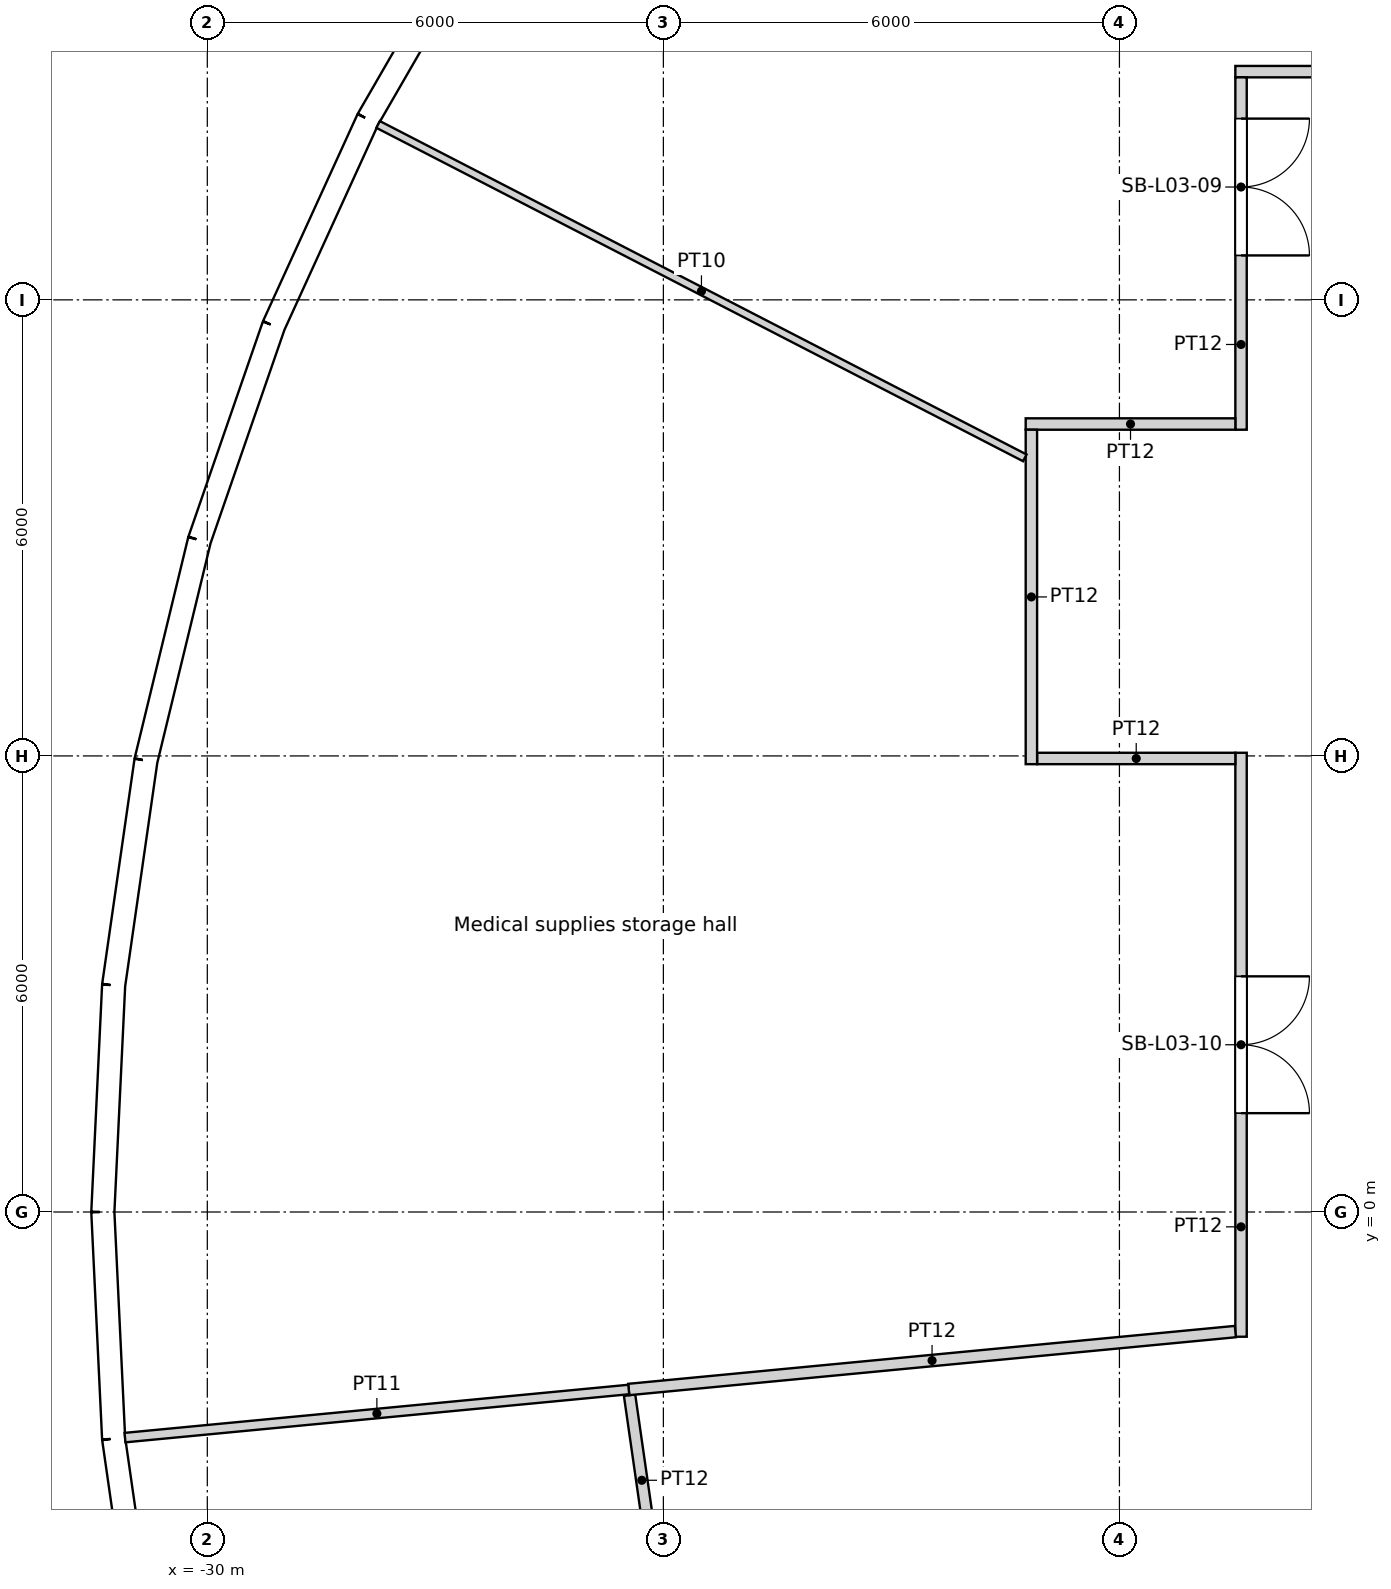
"""IFC4 building model, lengths in metres.
Left out: names, types, materials, properties, quantities, classifications, styles, units other than length and angle.
Written with IfcOpenShell. Run it as: python <this file> out.ifc"""

import sys

from ifc_helpers import new_model, si_unit, direction, frame, frame_2d, origin, origin_2d, place, context, subcontext, project, spatial, rectangle, circle, extrude, element, fill, save


model = new_model("IFC4")
c1 = context("Model", 3, precision=1e-05, world=origin(), true_north=direction((0.0, 1.0)))
c2 = subcontext(c1, "Body", "Model", "MODEL_VIEW")
j1 = project(units=[si_unit("LENGTHUNIT", "METRE"), si_unit("PLANEANGLEUNIT", "RADIAN")], contexts=[c1])
p1 = place(None, origin())
s1 = spatial("IfcSite", under=j1, at=p1, CompositionType="ELEMENT")
p2 = place(p1, origin())
s2 = spatial("IfcBuilding", under=s1, at=p2, CompositionType="ELEMENT")
p3 = place(p2, frame((0.0, 0.0, 18.6)))
s3 = spatial("IfcBuildingStorey", under=s2, at=p3, CompositionType="ELEMENT", Elevation=18.6)
for number, where, z_axis, x_axis in (
    (1, (-26.909, 13.873, 0.0), (0.0, 0.0, 1.0), (1.0, 0.0, 0.0)),
    (2, (-29.048, 8.529, 0.0), (0.0, 0.0, 1.0), (1.0, 0.0, 0.0)),
    (3, (-30.137, 2.878, 0.0), (0.0, 0.0, 1.0), (1.0, 0.0, 0.0)),
    (4, (-30.137, -2.878, 0.0), (0.0, 0.0, 1.0), (1.0, 0.0, 0.0)),
):
    element("IfcColumn", number, at=place(p3, frame(where, z_axis=z_axis, x_axis=x_axis)), inside=s3, PredefinedType="COLUMN", context=c2, shape_type="SweptSolid", body=[
        extrude(circle(Radius=0.7, at=origin_2d()), origin(), (0.0, 0.0, 1.0), 4.8),
    ])
for number, where, z_axis, x_axis in (
    (5, (-20.509, 13.489, 0.0), (0.0, 0.0, 1.0), (1.0, 0.0, 0.0)),
    (6, (-23.067, 8.396, 0.0), (0.0, 0.0, 1.0), (1.0, 0.0, 0.0)),
    (7, (-24.382, 2.85, 0.0), (0.0, 0.0, 1.0), (1.0, 0.0, 0.0)),
    (8, (-24.382, -2.85, 0.0), (0.0, 0.0, 1.0), (1.0, 0.0, 0.0)),
):
    element("IfcColumn", number, at=place(p3, frame(where, z_axis=z_axis, x_axis=x_axis)), inside=s3, PredefinedType="COLUMN", context=c2, shape_type="SweptSolid", body=[
        extrude(circle(Radius=0.75, at=origin_2d()), origin(), (0.0, 0.0, 1.0), 4.8),
    ])
for number, where, z_axis, x_axis in (
    (9, (-16.958, 8.167, 0.0), (0.0, 0.0, 1.0), (1.0, 0.0, 0.0)),
    (10, (-18.612, 2.805, 0.0), (0.0, 0.0, 1.0), (1.0, 0.0, 0.0)),
    (11, (-18.612, -2.805, 0.0), (0.0, 0.0, 1.0), (1.0, 0.0, 0.0)),
):
    element("IfcColumn", number, at=place(p3, frame(where, z_axis=z_axis, x_axis=x_axis)), inside=s3, PredefinedType="COLUMN", context=c2, shape_type="SweptSolid", body=[
        extrude(circle(Radius=0.8, at=origin_2d()), origin(), (0.0, 0.0, 1.0), 4.8),
    ])
p4 = place(p3, frame((-26.394, 16.962, 0.0), z_axis=(0.0, 0.0, 1.0), x_axis=(-0.500017373705, -0.866015372839, 0.0)))
e12 = element("IfcWall", 12, at=p4, inside=s3, PredefinedType="SOLIDWALL", context=c2, shape_type="SweptSolid", body=[
    extrude(rectangle(XDim=2.986, YDim=0.3, at=frame_2d((1.493, 0.0))), origin(), (0.0, 0.0, 1.0), 4.35),
])
p5 = place(p4, frame((1.493, 0.0, 2.0)))
e13 = element("IfcOpeningElement", 13, at=p5, cuts=e12, PredefinedType="OPENING", context=c2, shape_type="SweptSolid", body=[
    extrude(circle(Radius=1.2, at=origin_2d()), frame((0.0, 0.16, 0.0), z_axis=(0.0, -1.0, 0.0), x_axis=(1.0, 0.0, 0.0)), (0.0, 0.0, 1.0), 0.32),
])
p6 = place(p3, frame((-27.887, 14.377, 0.0), z_axis=(0.0, 0.0, 1.0), x_axis=(-0.415373250944, -0.909651066289, 0.0)))
e14 = element("IfcWall", 14, at=p6, inside=s3, PredefinedType="SOLIDWALL", context=c2, shape_type="SweptSolid", body=[
    extrude(rectangle(XDim=2.986, YDim=0.3, at=frame_2d((1.493, 0.0))), origin(), (0.0, 0.0, 1.0), 4.35),
])
p7 = place(p6, frame((1.493, 0.0, 2.0)))
e15 = element("IfcOpeningElement", 15, at=p7, cuts=e14, PredefinedType="OPENING", context=c2, shape_type="SweptSolid", body=[
    extrude(circle(Radius=1.2, at=origin_2d()), frame((0.0, 0.16, 0.0), z_axis=(0.0, -1.0, 0.0), x_axis=(1.0, 0.0, 0.0)), (0.0, 0.0, 1.0), 0.32),
])
p8 = place(p3, frame((-29.127, 11.661, 0.0), z_axis=(0.0, 0.0, 1.0), x_axis=(-0.327074054052, -0.944998710669, 0.0)))
e16 = element("IfcWall", 16, at=p8, inside=s3, PredefinedType="SOLIDWALL", context=c2, shape_type="SweptSolid", body=[
    extrude(rectangle(XDim=2.986, YDim=0.3, at=frame_2d((1.493, 0.0))), origin(), (0.0, 0.0, 1.0), 4.35),
])
p9 = place(p8, frame((1.493, 0.0, 2.0)))
e17 = element("IfcOpeningElement", 17, at=p9, cuts=e16, PredefinedType="OPENING", context=c2, shape_type="SweptSolid", body=[
    extrude(circle(Radius=1.2, at=origin_2d()), frame((0.0, 0.16, 0.0), z_axis=(0.0, -1.0, 0.0), x_axis=(1.0, 0.0, 0.0)), (0.0, 0.0, 1.0), 0.32),
])
p10 = place(p3, frame((-30.104, 8.839, 0.0), z_axis=(0.0, 0.0, 1.0), x_axis=(-0.235756834479, -0.971812078026, 0.0)))
e18 = element("IfcWall", 18, at=p10, inside=s3, PredefinedType="SOLIDWALL", context=c2, shape_type="SweptSolid", body=[
    extrude(rectangle(XDim=2.986, YDim=0.3, at=frame_2d((1.493, 0.0))), origin(), (0.0, 0.0, 1.0), 4.35),
])
p11 = place(p10, frame((1.493, 0.0, 2.0)))
e19 = element("IfcOpeningElement", 19, at=p11, cuts=e18, PredefinedType="OPENING", context=c2, shape_type="SweptSolid", body=[
    extrude(circle(Radius=1.2, at=origin_2d()), frame((0.0, 0.16, 0.0), z_axis=(0.0, -1.0, 0.0), x_axis=(1.0, 0.0, 0.0)), (0.0, 0.0, 1.0), 0.32),
])
p12 = place(p3, frame((-30.807, 5.938, 0.0), z_axis=(0.0, 0.0, 1.0), x_axis=(-0.142360001917, -0.989814947278, 0.0)))
e20 = element("IfcWall", 20, at=p12, inside=s3, PredefinedType="SOLIDWALL", context=c2, shape_type="SweptSolid", body=[
    extrude(rectangle(XDim=2.986, YDim=0.3, at=frame_2d((1.493, 0.0))), origin(), (0.0, 0.0, 1.0), 4.35),
])
p13 = place(p12, frame((1.493, 0.0, 2.0)))
e21 = element("IfcOpeningElement", 21, at=p13, cuts=e20, PredefinedType="OPENING", context=c2, shape_type="SweptSolid", body=[
    extrude(circle(Radius=1.2, at=origin_2d()), frame((0.0, 0.16, 0.0), z_axis=(0.0, -1.0, 0.0), x_axis=(1.0, 0.0, 0.0)), (0.0, 0.0, 1.0), 0.32),
])
p14 = place(p3, frame((-31.232, 2.982, 0.0), z_axis=(0.0, 0.0, 1.0), x_axis=(-0.047588458579, -0.998867027492, 0.0)))
e22 = element("IfcWall", 22, at=p14, inside=s3, PredefinedType="SOLIDWALL", context=c2, shape_type="SweptSolid", body=[
    extrude(rectangle(XDim=2.986, YDim=0.3, at=frame_2d((1.493, 0.0))), origin(), (0.0, 0.0, 1.0), 4.35),
])
p15 = place(p14, frame((1.493, 0.0, 2.0)))
e23 = element("IfcOpeningElement", 23, at=p15, cuts=e22, PredefinedType="OPENING", context=c2, shape_type="SweptSolid", body=[
    extrude(circle(Radius=1.2, at=origin_2d()), frame((0.0, 0.16, 0.0), z_axis=(0.0, -1.0, 0.0), x_axis=(1.0, 0.0, 0.0)), (0.0, 0.0, 1.0), 0.32),
])
p16 = place(p3, frame((-31.375, 0.0, 0.0), z_axis=(0.0, 0.0, 1.0), x_axis=(0.047588458579, -0.998867027492, 0.0)))
e24 = element("IfcWall", 24, at=p16, inside=s3, PredefinedType="SOLIDWALL", context=c2, shape_type="SweptSolid", body=[
    extrude(rectangle(XDim=2.986, YDim=0.3, at=frame_2d((1.493, 0.0))), origin(), (0.0, 0.0, 1.0), 4.35),
])
p17 = place(p16, frame((1.493, 0.0, 2.0)))
e25 = element("IfcOpeningElement", 25, at=p17, cuts=e24, PredefinedType="OPENING", context=c2, shape_type="SweptSolid", body=[
    extrude(circle(Radius=1.2, at=origin_2d()), frame((0.0, 0.16, 0.0), z_axis=(0.0, -1.0, 0.0), x_axis=(1.0, 0.0, 0.0)), (0.0, 0.0, 1.0), 0.32),
])
p18 = place(p3, frame((-31.232, -2.982, 0.0), z_axis=(0.0, 0.0, 1.0), x_axis=(0.142360001917, -0.989814947278, 0.0)))
e26 = element("IfcWall", 26, at=p18, inside=s3, PredefinedType="SOLIDWALL", context=c2, shape_type="SweptSolid", body=[
    extrude(rectangle(XDim=2.986, YDim=0.3, at=frame_2d((1.493, 0.0))), origin(), (0.0, 0.0, 1.0), 4.35),
])
p19 = place(p18, frame((1.493, 0.0, 2.0)))
e27 = element("IfcOpeningElement", 27, at=p19, cuts=e26, PredefinedType="OPENING", context=c2, shape_type="SweptSolid", body=[
    extrude(circle(Radius=1.2, at=origin_2d()), frame((0.0, 0.16, 0.0), z_axis=(0.0, -1.0, 0.0), x_axis=(1.0, 0.0, 0.0)), (0.0, 0.0, 1.0), 0.32),
])
p20 = place(p3, frame((-31.083, -2.968, 0.0), z_axis=(0.0, 0.0, 1.0), x_axis=(0.995472369192, 0.095051365982, 0.0)))
e28 = element("IfcWall", 28, at=p20, inside=s3, PredefinedType="PARTITIONING", context=c2, shape_type="SweptSolid", body=[
    extrude(rectangle(XDim=6.657, YDim=0.125, at=frame_2d((3.329, 0.0))), origin(), (0.0, 0.0, 1.0), 3.75),
])
p21 = place(p3, frame((-27.753, 14.308, 0.0), z_axis=(0.0, 0.0, 1.0), x_axis=(0.888834817613, -0.458227745776, 0.0)))
e29 = element("IfcWall", 29, at=p21, inside=s3, PredefinedType="PARTITIONING", context=c2, shape_type="SweptSolid", body=[
    extrude(rectangle(XDim=9.573, YDim=0.1, at=frame_2d((4.786, 0.0))), origin(), (0.0, 0.0, 1.0), 3.75),
])
p22 = place(p3, frame((-24.445, -2.409, 0.0), z_axis=(0.0, 0.0, 1.0), x_axis=(0.142297308559, -0.989823962115, 0.0)))
e30 = element("IfcWall", 30, at=p22, inside=s3, PredefinedType="PARTITIONING", context=c2, shape_type="SweptSolid", body=[
    extrude(rectangle(XDim=2.263, YDim=0.15, at=frame_2d((1.131, 0.0))), origin(), (0.0, 0.0, 1.0), 3.75),
])
p23 = place(p3, frame((-24.456, -2.335, 0.0), z_axis=(0.0, 0.0, 1.0), x_axis=(0.995470529319, 0.095070632993, 0.0)))
e31 = element("IfcWall", 31, at=p23, inside=s3, PredefinedType="PARTITIONING", context=c2, shape_type="SweptSolid", body=[
    extrude(rectangle(XDim=8.017, YDim=0.15, at=frame_2d((4.009, 0.0))), origin(), (0.0, 0.0, 1.0), 3.75),
])
p24 = place(p3, frame((-19.083, 5.967, 0.0), z_axis=(0.0, 0.0, 1.0), x_axis=(1.0, 0.0, 0.0)))
e32 = element("IfcWall", 32, at=p24, inside=s3, PredefinedType="PARTITIONING", context=c2, shape_type="SweptSolid", body=[
    extrude(rectangle(XDim=2.608, YDim=0.15, at=frame_2d((1.304, 0.0))), origin(), (0.0, 0.0, 1.0), 3.75),
])
p25 = place(p3, frame((-19.158, 10.292, 0.0), z_axis=(0.0, 0.0, 1.0), x_axis=(0.0, -1.0, 0.0)))
e33 = element("IfcWall", 33, at=p25, inside=s3, PredefinedType="PARTITIONING", context=c2, shape_type="SweptSolid", body=[
    extrude(rectangle(XDim=4.4, YDim=0.15, at=frame_2d((2.2, 0.0))), origin(), (0.0, 0.0, 1.0), 3.75),
])
p26 = place(p3, frame((-16.4, -1.641, 0.0), z_axis=(0.0, 0.0, 1.0), x_axis=(0.0, 1.0, 0.0)))
e34 = element("IfcWall", 34, at=p26, inside=s3, PredefinedType="PARTITIONING", context=c2, shape_type="SweptSolid", body=[
    extrude(rectangle(XDim=7.683, YDim=0.15, at=frame_2d((3.841, 0.0))), origin(), (0.0, 0.0, 1.0), 3.75),
])
p27 = place(p26, frame((2.941, 0.0, 0.0)))
e35 = element("IfcOpeningElement", 35, at=p27, cuts=e34, PredefinedType="OPENING", context=c2, shape_type="SweptSolid", body=[
    extrude(rectangle(XDim=1.8, YDim=2.4, at=frame_2d((0.9, 1.2))), frame((0.0, 0.075, 0.0), z_axis=(0.0, -1.0, 0.0), x_axis=(1.0, 0.0, 0.0)), (0.0, 0.0, 1.0), 0.15),
])
p28 = place(p3, frame((-16.475, 10.367, 0.0), z_axis=(0.0, 0.0, 1.0), x_axis=(-1.0, 0.0, 0.0)))
e36 = element("IfcWall", 36, at=p28, inside=s3, PredefinedType="PARTITIONING", context=c2, shape_type="SweptSolid", body=[
    extrude(rectangle(XDim=2.758, YDim=0.15, at=frame_2d((1.379, 0.0))), origin(), (0.0, 0.0, 1.0), 3.75),
])
p29 = place(p3, frame((-16.4, 10.292, 0.0), z_axis=(0.0, 0.0, 1.0), x_axis=(0.0, 1.0, 0.0)))
e37 = element("IfcWall", 37, at=p29, inside=s3, PredefinedType="PARTITIONING", context=c2, shape_type="SweptSolid", body=[
    extrude(rectangle(XDim=4.636, YDim=0.15, at=frame_2d((2.318, 0.0))), origin(), (0.0, 0.0, 1.0), 3.75),
])
p30 = place(p29, frame((2.293, 0.0, 0.0)))
e38 = element("IfcOpeningElement", 38, at=p30, cuts=e37, PredefinedType="OPENING", context=c2, shape_type="SweptSolid", body=[
    extrude(rectangle(XDim=1.8, YDim=2.4, at=frame_2d((0.9, 1.2))), frame((0.0, 0.075, 0.0), z_axis=(0.0, -1.0, 0.0), x_axis=(1.0, 0.0, 0.0)), (0.0, 0.0, 1.0), 0.15),
])
p31 = place(p3, frame((-11.523, 15.002, 0.0), z_axis=(0.0, 0.0, 1.0), x_axis=(-1.0, 0.0, 0.0)))
e39 = element("IfcWall", 39, at=p31, inside=s3, PredefinedType="PARTITIONING", context=c2, shape_type="SweptSolid", body=[
    extrude(rectangle(XDim=4.952, YDim=0.15, at=frame_2d((2.476, 0.0))), origin(), (0.0, 0.0, 1.0), 3.75),
])
p32 = place(p5, origin())
e40 = element("IfcWindow", 40, at=p32, inside=s3, PartitioningType="SINGLE_PANEL", PredefinedType="WINDOW", context=c2, shape_type="SweptSolid", body=[
    extrude(circle(Radius=1.2, at=origin_2d()), frame((0.0, 0.12, 0.0), z_axis=(0.0, -1.0, 0.0), x_axis=(1.0, 0.0, 0.0)), (0.0, 0.0, 1.0), 0.1),
])
fill(e13, e40)
p33 = place(p7, origin())
e41 = element("IfcWindow", 41, at=p33, inside=s3, PartitioningType="SINGLE_PANEL", PredefinedType="WINDOW", context=c2, shape_type="SweptSolid", body=[
    extrude(circle(Radius=1.2, at=origin_2d()), frame((0.0, 0.12, 0.0), z_axis=(0.0, -1.0, 0.0), x_axis=(1.0, 0.0, 0.0)), (0.0, 0.0, 1.0), 0.1),
])
fill(e15, e41)
p34 = place(p9, origin())
e42 = element("IfcWindow", 42, at=p34, inside=s3, PartitioningType="SINGLE_PANEL", PredefinedType="WINDOW", context=c2, shape_type="SweptSolid", body=[
    extrude(circle(Radius=1.2, at=origin_2d()), frame((0.0, 0.12, 0.0), z_axis=(0.0, -1.0, 0.0), x_axis=(1.0, 0.0, 0.0)), (0.0, 0.0, 1.0), 0.1),
])
fill(e17, e42)
p35 = place(p11, origin())
e43 = element("IfcWindow", 43, at=p35, inside=s3, PartitioningType="SINGLE_PANEL", PredefinedType="WINDOW", context=c2, shape_type="SweptSolid", body=[
    extrude(circle(Radius=1.2, at=origin_2d()), frame((0.0, 0.12, 0.0), z_axis=(0.0, -1.0, 0.0), x_axis=(1.0, 0.0, 0.0)), (0.0, 0.0, 1.0), 0.1),
])
fill(e19, e43)
p36 = place(p13, origin())
e44 = element("IfcWindow", 44, at=p36, inside=s3, PartitioningType="SINGLE_PANEL", PredefinedType="WINDOW", context=c2, shape_type="SweptSolid", body=[
    extrude(circle(Radius=1.2, at=origin_2d()), frame((0.0, 0.12, 0.0), z_axis=(0.0, -1.0, 0.0), x_axis=(1.0, 0.0, 0.0)), (0.0, 0.0, 1.0), 0.1),
])
fill(e21, e44)
p37 = place(p15, origin())
e45 = element("IfcWindow", 45, at=p37, inside=s3, PartitioningType="SINGLE_PANEL", PredefinedType="WINDOW", context=c2, shape_type="SweptSolid", body=[
    extrude(circle(Radius=1.2, at=origin_2d()), frame((0.0, 0.12, 0.0), z_axis=(0.0, -1.0, 0.0), x_axis=(1.0, 0.0, 0.0)), (0.0, 0.0, 1.0), 0.1),
])
fill(e23, e45)
p38 = place(p17, origin())
e46 = element("IfcWindow", 46, at=p38, inside=s3, PartitioningType="SINGLE_PANEL", PredefinedType="WINDOW", context=c2, shape_type="SweptSolid", body=[
    extrude(circle(Radius=1.2, at=origin_2d()), frame((0.0, 0.12, 0.0), z_axis=(0.0, -1.0, 0.0), x_axis=(1.0, 0.0, 0.0)), (0.0, 0.0, 1.0), 0.1),
])
fill(e25, e46)
p39 = place(p19, origin())
e47 = element("IfcWindow", 47, at=p39, inside=s3, PartitioningType="SINGLE_PANEL", PredefinedType="WINDOW", context=c2, shape_type="SweptSolid", body=[
    extrude(circle(Radius=1.2, at=origin_2d()), frame((0.0, 0.12, 0.0), z_axis=(0.0, -1.0, 0.0), x_axis=(1.0, 0.0, 0.0)), (0.0, 0.0, 1.0), 0.1),
])
fill(e27, e47)
p40 = place(p30, origin())
e48 = element("IfcDoor", 48, at=p40, inside=s3, OperationType="DOUBLE_DOOR_SINGLE_SWING", PredefinedType="DOOR", context=c2, shape_type="SweptSolid", body=[
    extrude(rectangle(XDim=1.8, YDim=2.4, at=frame_2d((0.9, 1.2))), frame((0.0, 0.025, 0.0), z_axis=(0.0, -1.0, 0.0), x_axis=(1.0, 0.0, 0.0)), (0.0, 0.0, 1.0), 0.05),
])
fill(e38, e48)
p41 = place(p27, origin())
e49 = element("IfcDoor", 49, at=p41, inside=s3, OperationType="DOUBLE_DOOR_SINGLE_SWING", PredefinedType="DOOR", context=c2, shape_type="SweptSolid", body=[
    extrude(rectangle(XDim=1.8, YDim=2.4, at=frame_2d((0.9, 1.2))), frame((0.0, 0.025, 0.0), z_axis=(0.0, -1.0, 0.0), x_axis=(1.0, 0.0, 0.0)), (0.0, 0.0, 1.0), 0.05),
])
fill(e35, e49)
save(model, sys.argv[1])
